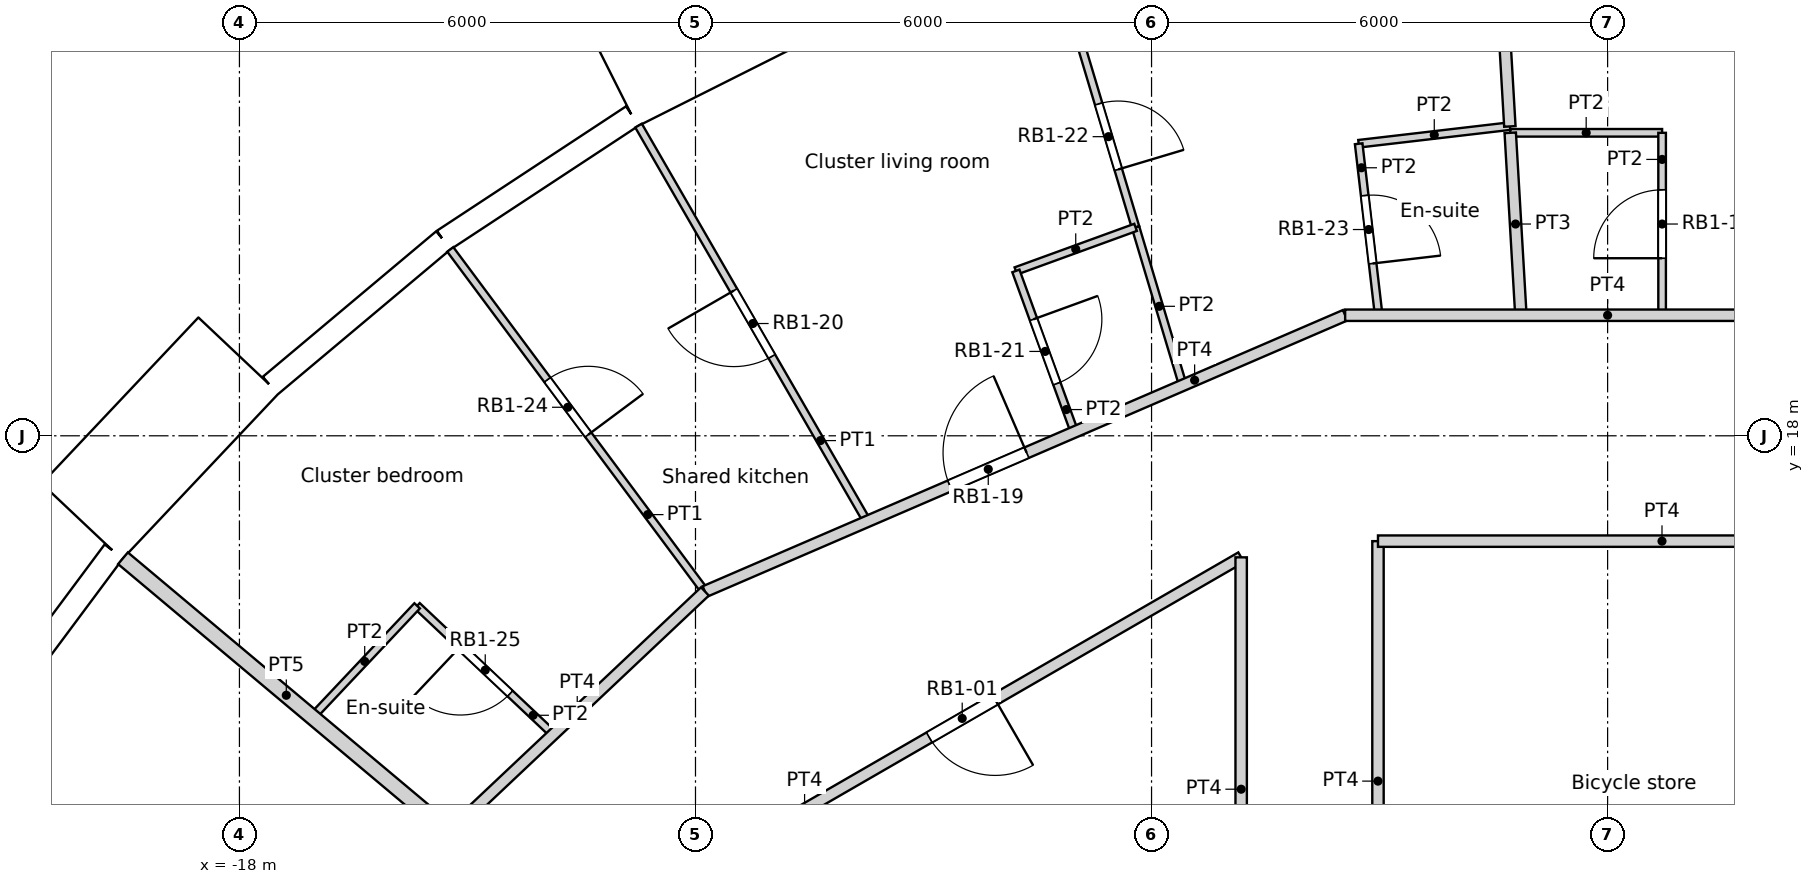
"""IFC4 building model, lengths in metres.
Left out: names, types, materials, properties, quantities, classifications, styles, units other than length and angle.
Written with IfcOpenShell. Run it as: python <this file> out.ifc"""

import sys

from ifc_helpers import new_model, si_unit, direction, frame, frame_2d, origin, origin_2d, place, context, subcontext, project, spatial, rectangle, circle, extrude, element, fill, save


model = new_model("IFC4")
c1 = context("Model", 3, precision=1e-05, world=origin(), true_north=direction((0.0, 1.0)))
c2 = subcontext(c1, "Body", "Model", "MODEL_VIEW")
j1 = project(units=[si_unit("LENGTHUNIT", "METRE"), si_unit("PLANEANGLEUNIT", "RADIAN")], contexts=[c1])
p1 = place(None, origin())
s1 = spatial("IfcSite", under=j1, at=p1, CompositionType="ELEMENT")
p2 = place(p1, origin())
s2 = spatial("IfcBuilding", under=s1, at=p2, CompositionType="ELEMENT")
p3 = place(p2, frame((0.0, 0.0, 126.0)))
s3 = spatial("IfcBuildingStorey", under=s2, at=p3, CompositionType="ELEMENT", Elevation=126.0)
for number, where, z_axis, x_axis in (
    (1, (-7.04, 23.516, 0.0), (0.0, 0.0, 1.0), (1.0, 0.0, 0.0)),
    (2, (-12.274, 21.259, 0.0), (0.0, 0.0, 1.0), (1.0, 0.0, 0.0)),
    (3, (-16.846, 17.855, 0.0), (0.0, 0.0, 1.0), (1.0, 0.0, 0.0)),
    (4, (-20.509, 13.489, 0.0), (0.0, 0.0, 1.0), (1.0, 0.0, 0.0)),
):
    element("IfcColumn", number, at=place(p3, frame(where, z_axis=z_axis, x_axis=x_axis)), inside=s3, PredefinedType="COLUMN", context=c2, shape_type="SweptSolid", body=[
        extrude(circle(Radius=0.6, at=origin_2d()), origin(), (0.0, 0.0, 1.0), 3.6),
    ])
for number, where, z_axis, x_axis in (
    (5, (1.406, 18.77, 0.0), (0.0, 0.0, 1.0), (1.0, 0.0, 0.0)),
    (6, (-4.188, 18.35, 0.0), (0.0, 0.0, 1.0), (1.0, 0.0, 0.0)),
    (7, (-9.411, 16.301, 0.0), (0.0, 0.0, 1.0), (1.0, 0.0, 0.0)),
    (8, (-13.798, 12.802, 0.0), (0.0, 0.0, 1.0), (1.0, 0.0, 0.0)),
):
    element("IfcColumn", number, at=place(p3, frame(where, z_axis=z_axis, x_axis=x_axis)), inside=s3, PredefinedType="COLUMN", context=c2, shape_type="SweptSolid", body=[
        extrude(circle(Radius=0.65, at=origin_2d()), origin(), (0.0, 0.0, 1.0), 3.6),
    ])
p4 = place(p3, frame((-10.409, 24.068, -0.3), z_axis=(0.0, 0.0, 1.0), x_axis=(-0.893628249713, -0.448807922518, 0.0)))
e9 = element("IfcWall", 9, at=p4, inside=s3, PredefinedType="ELEMENTEDWALL", context=c2, shape_type="SweptSolid", body=[
    extrude(rectangle(XDim=3.0, YDim=1.45, at=frame_2d((1.5, 0.0))), origin(), (0.0, 0.0, 1.0), 3.6),
])
p5 = place(p4, frame((1.5, 0.0, 1.85)))
e10 = element("IfcOpeningElement", 10, at=p5, cuts=e9, PredefinedType="OPENING", context=c2, shape_type="SweptSolid", body=[
    extrude(circle(Radius=0.9, at=origin_2d()), frame((0.0, 0.735, 0.0), z_axis=(0.0, -1.0, 0.0), x_axis=(1.0, 0.0, 0.0)), (0.0, 0.0, 1.0), 1.47),
])
p6 = place(p3, frame((-12.832, 22.206, 0.0), z_axis=(0.0, 0.0, 1.0), x_axis=(-0.835508361394, -0.54947773207, 0.0)))
e11 = element("IfcWall", 11, at=p6, inside=s3, PredefinedType="SOLIDWALL", context=c2, shape_type="SweptSolid", body=[
    extrude(rectangle(XDim=2.973, YDim=0.3, at=frame_2d((1.486, 0.0))), origin(), (0.0, 0.0, 1.0), 3.3),
])
p7 = place(p6, frame((1.486, 0.0, 1.55)))
e12 = element("IfcOpeningElement", 12, at=p7, cuts=e11, PredefinedType="OPENING", context=c2, shape_type="SweptSolid", body=[
    extrude(circle(Radius=0.9, at=origin_2d()), frame((0.0, 0.16, 0.0), z_axis=(0.0, -1.0, 0.0), x_axis=(1.0, 0.0, 0.0)), (0.0, 0.0, 1.0), 0.32),
])
p8 = place(p3, frame((-15.316, 20.573, 0.0), z_axis=(0.0, 0.0, 1.0), x_axis=(-0.766008913364, -0.642829950023, 0.0)))
e13 = element("IfcWall", 13, at=p8, inside=s3, PredefinedType="SOLIDWALL", context=c2, shape_type="SweptSolid", body=[
    extrude(rectangle(XDim=2.973, YDim=0.3, at=frame_2d((1.486, 0.0))), origin(), (0.0, 0.0, 1.0), 3.3),
])
p9 = place(p8, frame((1.486, 0.0, 1.55)))
e14 = element("IfcOpeningElement", 14, at=p9, cuts=e13, PredefinedType="OPENING", context=c2, shape_type="SweptSolid", body=[
    extrude(circle(Radius=0.9, at=origin_2d()), frame((0.0, 0.16, 0.0), z_axis=(0.0, -1.0, 0.0), x_axis=(1.0, 0.0, 0.0)), (0.0, 0.0, 1.0), 0.32),
])
p10 = place(p3, frame((-18.013, 19.056, -0.3), z_axis=(0.0, 0.0, 1.0), x_axis=(-0.686217177108, -0.727396718334, 0.0)))
e15 = element("IfcWall", 15, at=p10, inside=s3, PredefinedType="ELEMENTEDWALL", context=c2, shape_type="SweptSolid", body=[
    extrude(rectangle(XDim=3.0, YDim=1.45, at=frame_2d((1.5, 0.0))), origin(), (0.0, 0.0, 1.0), 3.6),
])
p11 = place(p10, frame((1.5, 0.0, 1.85)))
e16 = element("IfcOpeningElement", 16, at=p11, cuts=e15, PredefinedType="OPENING", context=c2, shape_type="SweptSolid", body=[
    extrude(circle(Radius=0.9, at=origin_2d()), frame((0.0, 0.735, 0.0), z_axis=(0.0, -1.0, 0.0), x_axis=(1.0, 0.0, 0.0)), (0.0, 0.0, 1.0), 1.47),
])
p12 = place(p3, frame((-19.653, 16.478, 0.0), z_axis=(0.0, 0.0, 1.0), x_axis=(-0.597197580538, -0.80209416517, 0.0)))
e17 = element("IfcWall", 17, at=p12, inside=s3, PredefinedType="SOLIDWALL", context=c2, shape_type="SweptSolid", body=[
    extrude(rectangle(XDim=2.973, YDim=0.3, at=frame_2d((1.486, 0.0))), origin(), (0.0, 0.0, 1.0), 3.3),
])
p13 = place(p12, frame((1.486, 0.0, 1.55)))
e18 = element("IfcOpeningElement", 18, at=p13, cuts=e17, PredefinedType="OPENING", context=c2, shape_type="SweptSolid", body=[
    extrude(circle(Radius=0.9, at=origin_2d()), frame((0.0, 0.16, 0.0), z_axis=(0.0, -1.0, 0.0), x_axis=(1.0, 0.0, 0.0)), (0.0, 0.0, 1.0), 0.32),
])
p14 = place(p3, frame((-4.821, 10.3, 0.0), z_axis=(0.0, 0.0, 1.0), x_axis=(0.0, 1.0, 0.0)))
e19 = element("IfcWall", 19, at=p14, inside=s3, PredefinedType="PARTITIONING", context=c2, shape_type="SweptSolid", body=[
    extrude(rectangle(XDim=6.101, YDim=0.15, at=frame_2d((3.05, 0.0))), origin(), (0.0, 0.0, 1.0), 3.3),
])
p15 = place(p3, frame((-12.162, 12.162, 0.0), z_axis=(0.0, 0.0, 1.0), x_axis=(0.866004766557, 0.500035743023, 0.0)))
e20 = element("IfcWall", 20, at=p15, inside=s3, PredefinedType="PARTITIONING", context=c2, shape_type="SweptSolid", body=[
    extrude(rectangle(XDim=8.477, YDim=0.15, at=frame_2d((4.239, 0.0))), origin(), (0.0, 0.0, 1.0), 3.3),
])
p16 = place(p15, frame((3.739, 0.0, 0.0)))
e21 = element("IfcOpeningElement", 21, at=p16, cuts=e20, PredefinedType="OPENING", context=c2, shape_type="SweptSolid", body=[
    extrude(rectangle(XDim=1.0, YDim=2.04, at=frame_2d((0.5, 1.02))), frame((0.0, 0.075, 0.0), z_axis=(0.0, -1.0, 0.0), x_axis=(1.0, 0.0, 0.0)), (0.0, 0.0, 1.0), 0.15),
])
p17 = place(p3, frame((-3.021, 16.614, 0.0), z_axis=(0.0, 0.0, 1.0), x_axis=(1.0, 0.0, 0.0)))
e22 = element("IfcWall", 22, at=p17, inside=s3, PredefinedType="PARTITIONING", context=c2, shape_type="SweptSolid", body=[
    extrude(rectangle(XDim=7.473, YDim=0.15, at=frame_2d((3.736, 0.0))), origin(), (0.0, 0.0, 1.0), 3.3),
])
p18 = place(p3, frame((-3.021, 10.3, 0.0), z_axis=(0.0, 0.0, 1.0), x_axis=(0.0, 1.0, 0.0)))
e23 = element("IfcWall", 23, at=p18, inside=s3, PredefinedType="PARTITIONING", context=c2, shape_type="SweptSolid", body=[
    extrude(rectangle(XDim=6.314, YDim=0.15, at=frame_2d((3.157, 0.0))), origin(), (0.0, 0.0, 1.0), 3.3),
])
p19 = place(p3, frame((-3.453, 19.586, 0.0), z_axis=(0.0, 0.0, 1.0), x_axis=(1.0, 0.0, 0.0)))
e24 = element("IfcWall", 24, at=p19, inside=s3, PredefinedType="PARTITIONING", context=c2, shape_type="SweptSolid", body=[
    extrude(rectangle(XDim=6.906, YDim=0.15, at=frame_2d((3.453, 0.0))), origin(), (0.0, 0.0, 1.0), 3.3),
])
p20 = place(p3, frame((-11.876, 15.952, 0.0), z_axis=(0.0, 0.0, 1.0), x_axis=(0.918189765505, 0.396140826629, 0.0)))
e25 = element("IfcWall", 25, at=p20, inside=s3, PredefinedType="PARTITIONING", context=c2, shape_type="SweptSolid", body=[
    extrude(rectangle(XDim=9.174, YDim=0.15, at=frame_2d((4.587, 0.0))), origin(), (0.0, 0.0, 1.0), 3.3),
])
p21 = place(p20, frame((3.51, 0.0, 0.0)))
e26 = element("IfcOpeningElement", 26, at=p21, cuts=e25, PredefinedType="OPENING", context=c2, shape_type="SweptSolid", body=[
    extrude(rectangle(XDim=1.1, YDim=2.1, at=frame_2d((0.55, 1.05))), frame((0.0, 0.075, 0.0), z_axis=(0.0, -1.0, 0.0), x_axis=(1.0, 0.0, 0.0)), (0.0, 0.0, 1.0), 0.15),
])
p22 = place(p3, frame((-15.235, 12.784, 0.0), z_axis=(0.0, 0.0, 1.0), x_axis=(0.7275818654, 0.686020866403, 0.0)))
e27 = element("IfcWall", 27, at=p22, inside=s3, PredefinedType="PARTITIONING", context=c2, shape_type="SweptSolid", body=[
    extrude(rectangle(XDim=4.617, YDim=0.15, at=frame_2d((2.309, 0.0))), origin(), (0.0, 0.0, 1.0), 3.3),
])
p23 = place(p3, frame((0.717, 19.586, 0.0), z_axis=(0.0, 0.0, 1.0), x_axis=(0.0, 1.0, 0.0)))
e28 = element("IfcWall", 28, at=p23, inside=s3, PredefinedType="PARTITIONING", context=c2, shape_type="SweptSolid", body=[
    extrude(rectangle(XDim=2.4, YDim=0.1, at=frame_2d((1.2, 0.0))), origin(), (0.0, 0.0, 1.0), 3.3),
])
p24 = place(p23, frame((0.75, 0.0, 0.0)))
e29 = element("IfcOpeningElement", 29, at=p24, cuts=e28, PredefinedType="OPENING", context=c2, shape_type="SweptSolid", body=[
    extrude(rectangle(XDim=0.9, YDim=2.04, at=frame_2d((0.45, 1.02))), frame((0.0, 0.05, 0.0), z_axis=(0.0, -1.0, 0.0), x_axis=(1.0, 0.0, 0.0)), (0.0, 0.0, 1.0), 0.1),
])
p25 = place(p3, frame((-1.281, 21.986, 0.0), z_axis=(0.0, 0.0, 1.0), x_axis=(1.0, 0.0, 0.0)))
e30 = element("IfcWall", 30, at=p25, inside=s3, PredefinedType="PARTITIONING", context=c2, shape_type="SweptSolid", body=[
    extrude(rectangle(XDim=1.998, YDim=0.1, at=frame_2d((0.999, 0.0))), origin(), (0.0, 0.0, 1.0), 3.3),
])
p26 = place(p3, frame((-1.483, 25.454, 0.0), z_axis=(0.0, 0.0, 1.0), x_axis=(0.058122482782, -0.998309459534, 0.0)))
e31 = element("IfcWall", 31, at=p26, inside=s3, PredefinedType="PARTITIONING", context=c2, shape_type="SweptSolid", body=[
    extrude(rectangle(XDim=3.39, YDim=0.15, at=frame_2d((1.695, 0.0))), origin(), (0.0, 0.0, 1.0), 3.3),
])
p27 = place(p3, frame((-1.281, 21.986, 0.0), z_axis=(0.0, 0.0, 1.0), x_axis=(0.058186267039, -0.998305743912, 0.0)))
e32 = element("IfcWall", 32, at=p27, inside=s3, PredefinedType="PARTITIONING", context=c2, shape_type="SweptSolid", body=[
    extrude(rectangle(XDim=2.404, YDim=0.15, at=frame_2d((1.202, 0.0))), origin(), (0.0, 0.0, 1.0), 3.3),
])
p28 = place(p3, frame((-12.749, 22.081, 0.0), z_axis=(0.0, 0.0, 1.0), x_axis=(0.50002935287, -0.866008456234, 0.0)))
e33 = element("IfcWall", 33, at=p28, inside=s3, PredefinedType="PARTITIONING", context=c2, shape_type="SweptSolid", body=[
    extrude(rectangle(XDim=6.014, YDim=0.1, at=frame_2d((3.007, 0.0))), origin(), (0.0, 0.0, 1.0), 3.3),
])
p29 = place(p28, frame((2.507, 0.0, 0.0)))
e34 = element("IfcOpeningElement", 34, at=p29, cuts=e33, PredefinedType="OPENING", context=c2, shape_type="SweptSolid", body=[
    extrude(rectangle(XDim=1.0, YDim=2.04, at=frame_2d((0.5, 1.02))), frame((0.0, 0.05, 0.0), z_axis=(0.0, -1.0, 0.0), x_axis=(1.0, 0.0, 0.0)), (0.0, 0.0, 1.0), 0.1),
])
p30 = place(p3, frame((-7.785, 20.169, 0.0), z_axis=(0.0, 0.0, 1.0), x_axis=(0.939738119152, 0.341895111711, 0.0)))
e35 = element("IfcWall", 35, at=p30, inside=s3, PredefinedType="PARTITIONING", context=c2, shape_type="SweptSolid", body=[
    extrude(rectangle(XDim=1.676, YDim=0.1, at=frame_2d((0.838, 0.0))), origin(), (0.0, 0.0, 1.0), 3.3),
])
p31 = place(p3, frame((-7.785, 20.169, 0.0), z_axis=(0.0, 0.0, 1.0), x_axis=(0.341934316543, -0.939723854742, 0.0)))
e36 = element("IfcWall", 36, at=p31, inside=s3, PredefinedType="PARTITIONING", context=c2, shape_type="SweptSolid", body=[
    extrude(rectangle(XDim=2.255, YDim=0.1, at=frame_2d((1.127, 0.0))), origin(), (0.0, 0.0, 1.0), 3.3),
])
p32 = place(p31, frame((0.677, 0.0, 0.0)))
e37 = element("IfcOpeningElement", 37, at=p32, cuts=e36, PredefinedType="OPENING", context=c2, shape_type="SweptSolid", body=[
    extrude(rectangle(XDim=0.9, YDim=2.0, at=frame_2d((0.45, 1.0))), frame((0.0, 0.05, 0.0), z_axis=(0.0, -1.0, 0.0), x_axis=(1.0, 0.0, 0.0)), (0.0, 0.0, 1.0), 0.1),
])
p33 = place(p3, frame((-7.313, 24.426, 0.0), z_axis=(0.0, 0.0, 1.0), x_axis=(0.286823657337, -0.957983397347, 0.0)))
e38 = element("IfcWall", 38, at=p33, inside=s3, PredefinedType="PARTITIONING", context=c2, shape_type="SweptSolid", body=[
    extrude(rectangle(XDim=3.846, YDim=0.1, at=frame_2d((1.923, 0.0))), origin(), (0.0, 0.0, 1.0), 3.3),
])
p34 = place(p33, frame((2.15, 0.0, 0.0)))
e39 = element("IfcOpeningElement", 39, at=p34, cuts=e38, PredefinedType="OPENING", context=c2, shape_type="SweptSolid", body=[
    extrude(rectangle(XDim=0.9, YDim=2.1, at=frame_2d((0.45, 1.05))), frame((0.0, 0.05, 0.0), z_axis=(0.0, -1.0, 0.0), x_axis=(1.0, 0.0, 0.0)), (0.0, 0.0, 1.0), 0.1),
])
p35 = place(p3, frame((-15.226, 20.452, 0.0), z_axis=(0.0, 0.0, 1.0), x_axis=(0.597155355437, -0.802125602056, 0.0)))
e40 = element("IfcWall", 40, at=p35, inside=s3, PredefinedType="PARTITIONING", context=c2, shape_type="SweptSolid", body=[
    extrude(rectangle(XDim=5.61, YDim=0.1, at=frame_2d((2.805, 0.0))), origin(), (0.0, 0.0, 1.0), 3.3),
])
p36 = place(p35, frame((2.139, 0.0, 0.0)))
e41 = element("IfcOpeningElement", 41, at=p36, cuts=e40, PredefinedType="OPENING", context=c2, shape_type="SweptSolid", body=[
    extrude(rectangle(XDim=0.9, YDim=2.1, at=frame_2d((0.45, 1.05))), frame((0.0, 0.05, 0.0), z_axis=(0.0, -1.0, 0.0), x_axis=(1.0, 0.0, 0.0)), (0.0, 0.0, 1.0), 0.1),
])
p37 = place(p3, frame((-6.21, 20.742, 0.0), z_axis=(0.0, 0.0, 1.0), x_axis=(0.286924287417, -0.957953262581, 0.0)))
e42 = element("IfcWall", 42, at=p37, inside=s3, PredefinedType="PARTITIONING", context=c2, shape_type="SweptSolid", body=[
    extrude(rectangle(XDim=2.168, YDim=0.1, at=frame_2d((1.084, 0.0))), origin(), (0.0, 0.0, 1.0), 3.3),
])
p38 = place(p3, frame((-3.275, 21.842, 0.0), z_axis=(0.0, 0.0, 1.0), x_axis=(0.993269919916, 0.115822563388, 0.0)))
e43 = element("IfcWall", 43, at=p38, inside=s3, PredefinedType="PARTITIONING", context=c2, shape_type="SweptSolid", body=[
    extrude(rectangle(XDim=2.002, YDim=0.1, at=frame_2d((1.001, 0.0))), origin(), (0.0, 0.0, 1.0), 3.3),
])
p39 = place(p3, frame((-3.275, 21.842, 0.0), z_axis=(0.0, 0.0, 1.0), x_axis=(0.115762284594, -0.993276947012, 0.0)))
e44 = element("IfcWall", 44, at=p39, inside=s3, PredefinedType="PARTITIONING", context=c2, shape_type="SweptSolid", body=[
    extrude(rectangle(XDim=2.271, YDim=0.1, at=frame_2d((1.136, 0.0))), origin(), (0.0, 0.0, 1.0), 3.3),
])
p40 = place(p39, frame((0.686, 0.0, 0.0)))
e45 = element("IfcOpeningElement", 45, at=p40, cuts=e44, PredefinedType="OPENING", context=c2, shape_type="SweptSolid", body=[
    extrude(rectangle(XDim=0.9, YDim=2.04, at=frame_2d((0.45, 1.02))), frame((0.0, 0.05, 0.0), z_axis=(0.0, -1.0, 0.0), x_axis=(1.0, 0.0, 0.0)), (0.0, 0.0, 1.0), 0.1),
])
p41 = place(p3, frame((-15.662, 15.763, 0.0), z_axis=(0.0, 0.0, 1.0), x_axis=(0.727320856717, -0.686297582237, 0.0)))
e46 = element("IfcWall", 46, at=p41, inside=s3, PredefinedType="PARTITIONING", context=c2, shape_type="SweptSolid", body=[
    extrude(rectangle(XDim=2.464, YDim=0.1, at=frame_2d((1.232, 0.0))), origin(), (0.0, 0.0, 1.0), 3.3),
])
p42 = place(p41, frame((0.782, 0.0, 0.0)))
e47 = element("IfcOpeningElement", 47, at=p42, cuts=e46, PredefinedType="OPENING", context=c2, shape_type="SweptSolid", body=[
    extrude(rectangle(XDim=0.9, YDim=2.04, at=frame_2d((0.45, 1.02))), frame((0.0, 0.05, 0.0), z_axis=(0.0, -1.0, 0.0), x_axis=(1.0, 0.0, 0.0)), (0.0, 0.0, 1.0), 0.1),
])
p43 = place(p3, frame((-17.042, 14.3, 0.0), z_axis=(0.0, 0.0, 1.0), x_axis=(0.686167098493, 0.727443958629, 0.0)))
e48 = element("IfcWall", 48, at=p43, inside=s3, PredefinedType="PARTITIONING", context=c2, shape_type="SweptSolid", body=[
    extrude(rectangle(XDim=2.011, YDim=0.1, at=frame_2d((1.005, 0.0))), origin(), (0.0, 0.0, 1.0), 3.3),
])
p44 = place(p3, frame((-19.532, 16.389, 0.0), z_axis=(0.0, 0.0, 1.0), x_axis=(0.76609059793, -0.642732600514, 0.0)))
e49 = element("IfcWall", 49, at=p44, inside=s3, PredefinedType="PARTITIONING", context=c2, shape_type="SweptSolid", body=[
    extrude(rectangle(XDim=5.609, YDim=0.2, at=frame_2d((2.804, 0.0))), origin(), (0.0, 0.0, 1.0), 3.3),
])
p45 = place(p5, origin())
e50 = element("IfcWindow", 50, at=p45, inside=s3, PartitioningType="SINGLE_PANEL", PredefinedType="WINDOW", context=c2, shape_type="SweptSolid", body=[
    extrude(circle(Radius=0.9, at=origin_2d()), frame((0.0, 0.695, 0.0), z_axis=(0.0, -1.0, 0.0), x_axis=(1.0, 0.0, 0.0)), (0.0, 0.0, 1.0), 0.1),
])
fill(e10, e50)
p46 = place(p7, origin())
e51 = element("IfcWindow", 51, at=p46, inside=s3, PartitioningType="SINGLE_PANEL", PredefinedType="WINDOW", context=c2, shape_type="SweptSolid", body=[
    extrude(circle(Radius=0.9, at=origin_2d()), frame((0.0, 0.12, 0.0), z_axis=(0.0, -1.0, 0.0), x_axis=(1.0, 0.0, 0.0)), (0.0, 0.0, 1.0), 0.1),
])
fill(e12, e51)
p47 = place(p9, origin())
e52 = element("IfcWindow", 52, at=p47, inside=s3, PartitioningType="SINGLE_PANEL", PredefinedType="WINDOW", context=c2, shape_type="SweptSolid", body=[
    extrude(circle(Radius=0.9, at=origin_2d()), frame((0.0, 0.12, 0.0), z_axis=(0.0, -1.0, 0.0), x_axis=(1.0, 0.0, 0.0)), (0.0, 0.0, 1.0), 0.1),
])
fill(e14, e52)
p48 = place(p11, origin())
e53 = element("IfcWindow", 53, at=p48, inside=s3, PartitioningType="SINGLE_PANEL", PredefinedType="WINDOW", context=c2, shape_type="SweptSolid", body=[
    extrude(circle(Radius=0.9, at=origin_2d()), frame((0.0, 0.695, 0.0), z_axis=(0.0, -1.0, 0.0), x_axis=(1.0, 0.0, 0.0)), (0.0, 0.0, 1.0), 0.1),
])
fill(e16, e53)
p49 = place(p13, origin())
e54 = element("IfcWindow", 54, at=p49, inside=s3, PartitioningType="SINGLE_PANEL", PredefinedType="WINDOW", context=c2, shape_type="SweptSolid", body=[
    extrude(circle(Radius=0.9, at=origin_2d()), frame((0.0, 0.12, 0.0), z_axis=(0.0, -1.0, 0.0), x_axis=(1.0, 0.0, 0.0)), (0.0, 0.0, 1.0), 0.1),
])
fill(e18, e54)
p50 = place(p16, origin())
e55 = element("IfcDoor", 55, at=p50, inside=s3, OperationType="SINGLE_SWING_LEFT", PredefinedType="DOOR", context=c2, shape_type="SweptSolid", body=[
    extrude(rectangle(XDim=1.0, YDim=2.04, at=frame_2d((0.5, 1.02))), frame((0.0, 0.025, 0.0), z_axis=(0.0, -1.0, 0.0), x_axis=(1.0, 0.0, 0.0)), (0.0, 0.0, 1.0), 0.05),
])
fill(e21, e55)
p51 = place(p24, origin())
e56 = element("IfcDoor", 56, at=p51, inside=s3, OperationType="SINGLE_SWING_LEFT", PredefinedType="DOOR", context=c2, shape_type="SweptSolid", body=[
    extrude(rectangle(XDim=0.9, YDim=2.04, at=frame_2d((0.45, 1.02))), frame((0.0, 0.025, 0.0), z_axis=(0.0, -1.0, 0.0), x_axis=(1.0, 0.0, 0.0)), (0.0, 0.0, 1.0), 0.05),
])
fill(e29, e56)
p52 = place(p21, origin())
e57 = element("IfcDoor", 57, at=p52, inside=s3, OperationType="SINGLE_SWING_RIGHT", PredefinedType="DOOR", context=c2, shape_type="SweptSolid", body=[
    extrude(rectangle(XDim=1.1, YDim=2.1, at=frame_2d((0.55, 1.05))), frame((0.0, 0.025, 0.0), z_axis=(0.0, -1.0, 0.0), x_axis=(1.0, 0.0, 0.0)), (0.0, 0.0, 1.0), 0.05),
])
fill(e26, e57)
p53 = place(p29, origin())
e58 = element("IfcDoor", 58, at=p53, inside=s3, OperationType="SINGLE_SWING_RIGHT", PredefinedType="DOOR", context=c2, shape_type="SweptSolid", body=[
    extrude(rectangle(XDim=1.0, YDim=2.04, at=frame_2d((0.5, 1.02))), frame((0.0, 0.025, 0.0), z_axis=(0.0, -1.0, 0.0), x_axis=(1.0, 0.0, 0.0)), (0.0, 0.0, 1.0), 0.05),
])
fill(e34, e58)
p54 = place(p32, origin())
e59 = element("IfcDoor", 59, at=p54, inside=s3, OperationType="SINGLE_SWING_LEFT", PredefinedType="DOOR", context=c2, shape_type="SweptSolid", body=[
    extrude(rectangle(XDim=0.9, YDim=2.0, at=frame_2d((0.45, 1.0))), frame((0.0, 0.025, 0.0), z_axis=(0.0, -1.0, 0.0), x_axis=(1.0, 0.0, 0.0)), (0.0, 0.0, 1.0), 0.05),
])
fill(e37, e59)
p55 = place(p34, origin())
e60 = element("IfcDoor", 60, at=p55, inside=s3, OperationType="SINGLE_SWING_RIGHT", PredefinedType="DOOR", context=c2, shape_type="SweptSolid", body=[
    extrude(rectangle(XDim=0.9, YDim=2.1, at=frame_2d((0.45, 1.05))), frame((0.0, 0.025, 0.0), z_axis=(0.0, -1.0, 0.0), x_axis=(1.0, 0.0, 0.0)), (0.0, 0.0, 1.0), 0.05),
])
fill(e39, e60)
p56 = place(p40, origin())
e61 = element("IfcDoor", 61, at=p56, inside=s3, OperationType="SINGLE_SWING_RIGHT", PredefinedType="DOOR", context=c2, shape_type="SweptSolid", body=[
    extrude(rectangle(XDim=0.9, YDim=2.04, at=frame_2d((0.45, 1.02))), frame((0.0, 0.025, 0.0), z_axis=(0.0, -1.0, 0.0), x_axis=(1.0, 0.0, 0.0)), (0.0, 0.0, 1.0), 0.05),
])
fill(e45, e61)
p57 = place(p36, origin())
e62 = element("IfcDoor", 62, at=p57, inside=s3, OperationType="SINGLE_SWING_RIGHT", PredefinedType="DOOR", context=c2, shape_type="SweptSolid", body=[
    extrude(rectangle(XDim=0.9, YDim=2.1, at=frame_2d((0.45, 1.05))), frame((0.0, 0.025, 0.0), z_axis=(0.0, -1.0, 0.0), x_axis=(1.0, 0.0, 0.0)), (0.0, 0.0, 1.0), 0.05),
])
fill(e41, e62)
p58 = place(p42, origin())
e63 = element("IfcDoor", 63, at=p58, inside=s3, OperationType="SINGLE_SWING_RIGHT", PredefinedType="DOOR", context=c2, shape_type="SweptSolid", body=[
    extrude(rectangle(XDim=0.9, YDim=2.04, at=frame_2d((0.45, 1.02))), frame((0.0, 0.025, 0.0), z_axis=(0.0, -1.0, 0.0), x_axis=(1.0, 0.0, 0.0)), (0.0, 0.0, 1.0), 0.05),
])
fill(e47, e63)
save(model, sys.argv[1])
